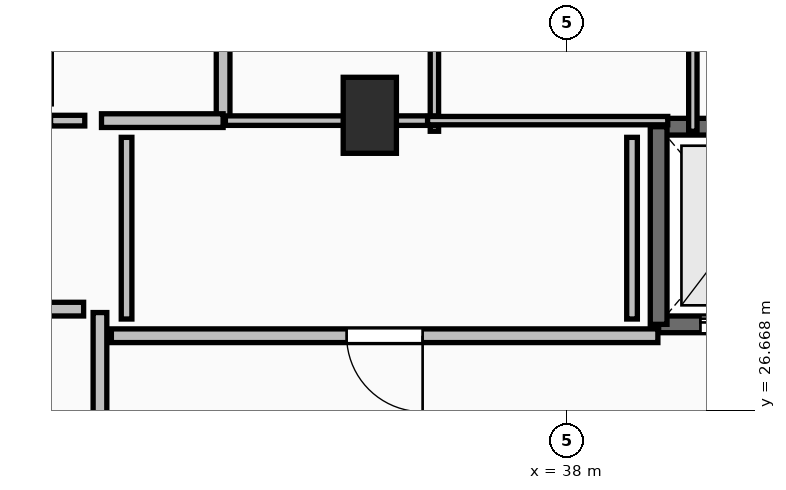
"""IFC4 building model, lengths in metres.
Left out: names, types, materials, properties, quantities, classifications, styles, units other than length and angle.
Written with IfcOpenShell. Run it as: python <this file> out.ifc"""

import sys

from ifc_helpers import new_model, si_unit, direction, frame, frame_2d, origin, origin_2d, place, context, subcontext, project, spatial, rectangle, extrude, element, fill, save


model = new_model("IFC4")
c1 = context("Model", 3, precision=1e-05, world=origin(), true_north=direction((0.0, 1.0)))
c2 = subcontext(c1, "Body", "Model", "MODEL_VIEW")
j1 = project(units=[si_unit("LENGTHUNIT", "METRE"), si_unit("PLANEANGLEUNIT", "RADIAN")], contexts=[c1])
p1 = place(None, origin())
s1 = spatial("IfcSite", under=j1, at=p1, CompositionType="ELEMENT")
p2 = place(p1, origin())
s2 = spatial("IfcBuilding", under=s1, at=p2, CompositionType="ELEMENT")
p3 = place(p2, frame((0.0, 0.0, 255.55)))
s3 = spatial("IfcBuildingStorey", under=s2, at=p3, CompositionType="ELEMENT", Elevation=255.55)
p4 = place(p3, frame((35.4, 30.55, 0.0), z_axis=(0.0, 0.0, 1.0), x_axis=(1.0, 0.0, 0.0)))
e1 = element("IfcColumn", 1, at=p4, inside=s3, PredefinedType="PILASTER", context=c2, shape_type="SweptSolid", body=[
    extrude(rectangle(XDim=0.7, YDim=1.0, at=origin_2d()), origin(), (0.0, 0.0, 1.0), 3.55),
])
p5 = place(p3, frame((39.2, 27.8, 0.0), z_axis=(0.0, 0.0, 1.0), x_axis=(1.0, 0.0, 0.0)))
e2 = element("IfcWall", 2, at=p5, inside=s3, PredefinedType="SOLIDWALL", context=c2, shape_type="SweptSolid", body=[
    extrude(rectangle(XDim=2.2, YDim=0.22, at=frame_2d((1.1, 0.0))), origin(), (0.0, 0.0, 1.0), 3.29),
])
p6 = place(p5, frame((0.55, 0.0, 0.0)))
e3 = element("IfcOpeningElement", 3, at=p6, cuts=e2, PredefinedType="OPENING", context=c2, shape_type="SweptSolid", body=[
    extrude(rectangle(XDim=1.1, YDim=2.2, at=frame_2d((0.55, 1.1))), frame((0.0, 0.125, 0.0), z_axis=(0.0, -1.0, 0.0), x_axis=(1.0, 0.0, 0.0)), (0.0, 0.0, 1.0), 0.25),
])
p7 = place(p3, frame((41.4, 30.4, 0.0), z_axis=(0.0, 0.0, 1.0), x_axis=(-1.0, 0.0, 0.0)))
e4 = element("IfcWall", 4, at=p7, inside=s3, PredefinedType="SOLIDWALL", context=c2, shape_type="SweptSolid", body=[
    extrude(rectangle(XDim=2.2, YDim=0.22, at=frame_2d((1.1, 0.0))), origin(), (0.0, 0.0, 1.0), 3.29),
])
p8 = place(p3, frame((39.2, 30.4, 0.0), z_axis=(0.0, 0.0, 1.0), x_axis=(0.0, -1.0, 0.0)))
e5 = element("IfcWall", 5, at=p8, inside=s3, PredefinedType="SOLIDWALL", context=c2, shape_type="SweptSolid", body=[
    extrude(rectangle(XDim=2.6, YDim=0.22, at=frame_2d((1.3, 0.0))), origin(), (0.0, 0.0, 1.0), 3.29),
])
p9 = place(p3, frame((31.85, 24.045, 0.0), z_axis=(0.0, 0.0, 1.0), x_axis=(0.0, 1.0, 0.0)))
e6 = element("IfcWall", 6, at=p9, inside=s3, PredefinedType="PARTITIONING", context=c2, shape_type="SweptSolid", body=[
    extrude(rectangle(XDim=3.91, YDim=0.18, at=frame_2d((1.955, 0.0))), origin(), (0.0, 0.0, 1.0), 3.29),
])
p10 = place(p9, frame((1.355, 0.0, 0.0)))
e7 = element("IfcOpeningElement", 7, at=p10, cuts=e6, PredefinedType="OPENING", context=c2, shape_type="SweptSolid", body=[
    extrude(rectangle(XDim=1.2, YDim=2.15, at=frame_2d((0.6, 1.075))), frame((0.0, 0.105, 0.0), z_axis=(0.0, -1.0, 0.0), x_axis=(1.0, 0.0, 0.0)), (0.0, 0.0, 1.0), 0.21),
])
p11 = place(p3, frame((33.47, 30.48, 0.0), z_axis=(0.0, 0.0, 1.0), x_axis=(0.0, 1.0, 0.0)))
e8 = element("IfcWall", 8, at=p11, inside=s3, PredefinedType="PARTITIONING", context=c2, shape_type="SweptSolid", body=[
    extrude(rectangle(XDim=3.28, YDim=0.18, at=frame_2d((1.64, 0.0))), origin(), (0.0, 0.0, 1.0), 3.29),
])
p12 = place(p11, frame((1.215, 0.0, 0.0)))
e9 = element("IfcOpeningElement", 9, at=p12, cuts=e8, PredefinedType="OPENING", context=c2, shape_type="SweptSolid", body=[
    extrude(rectangle(XDim=0.85, YDim=2.1, at=frame_2d((0.425, 1.05))), frame((0.0, 0.105, 0.0), z_axis=(0.0, -1.0, 0.0), x_axis=(1.0, 0.0, 0.0)), (0.0, 0.0, 1.0), 0.21),
])
p13 = place(p3, frame((31.87, 30.48, 0.0), z_axis=(0.0, 0.0, 1.0), x_axis=(1.0, 0.0, 0.0)))
e10 = element("IfcWall", 10, at=p13, inside=s3, PredefinedType="PARTITIONING", context=c2, shape_type="SweptSolid", body=[
    extrude(rectangle(XDim=1.6, YDim=0.18, at=frame_2d((0.8, 0.0))), origin(), (0.0, 0.0, 1.0), 3.29),
])
p14 = place(p3, frame((39.19, 27.65, 0.0), z_axis=(0.0, 0.0, 1.0), x_axis=(-1.0, 0.0, 0.0)))
e11 = element("IfcWall", 11, at=p14, inside=s3, PredefinedType="PARTITIONING", context=c2, shape_type="SweptSolid", body=[
    extrude(rectangle(XDim=7.19, YDim=0.18, at=frame_2d((3.595, 0.0))), origin(), (0.0, 0.0, 1.0), 3.29),
])
p15 = place(p14, frame((3.095, 0.0, 0.0)))
e12 = element("IfcOpeningElement", 12, at=p15, cuts=e11, PredefinedType="OPENING", context=c2, shape_type="SweptSolid", body=[
    extrude(rectangle(XDim=1.0, YDim=2.15, at=frame_2d((0.5, 1.075))), frame((0.0, 0.105, 0.0), z_axis=(0.0, -1.0, 0.0), x_axis=(1.0, 0.0, 0.0)), (0.0, 0.0, 1.0), 0.21),
])
p16 = place(p3, frame((36.25, 30.34, 0.0), z_axis=(0.0, 0.0, 1.0), x_axis=(0.0, 1.0, 0.0)))
e13 = element("IfcWall", 13, at=p16, inside=s3, PredefinedType="PARTITIONING", context=c2, shape_type="SweptSolid", body=[
    extrude(rectangle(XDim=3.56, YDim=0.11, at=frame_2d((1.78, 0.0))), origin(), (0.0, 0.0, 1.0), 2.482),
])
p17 = place(p3, frame((33.5, 30.48, 0.0), z_axis=(0.0, 0.0, 1.0), x_axis=(1.0, 0.0, 0.0)))
e14 = element("IfcWall", 14, at=p17, inside=s3, PredefinedType="PARTITIONING", context=c2, shape_type="SweptSolid", body=[
    extrude(rectangle(XDim=2.75, YDim=0.125, at=frame_2d((1.375, 0.0))), origin(), (0.0, 0.0, 1.0), 2.482),
])
p18 = place(p3, frame((39.65, 30.34, 0.0), z_axis=(0.0, 0.0, 1.0), x_axis=(0.0, 1.0, 0.0)))
e15 = element("IfcWall", 15, at=p18, inside=s3, PredefinedType="PARTITIONING", context=c2, shape_type="SweptSolid", body=[
    extrude(rectangle(XDim=3.56, YDim=0.11, at=frame_2d((1.78, 0.0))), origin(), (0.0, 0.0, 1.0), 2.482),
])
p19 = place(p3, frame((36.16, 30.48, 0.0), z_axis=(0.0, 0.0, 1.0), x_axis=(1.0, 0.0, 0.0)))
e16 = element("IfcWall", 16, at=p19, inside=s3, PredefinedType="PARTITIONING", context=c2, shape_type="SweptSolid", body=[
    extrude(rectangle(XDim=3.16, YDim=0.11, at=frame_2d((1.58, 0.0))), origin(), (0.0, 0.0, 1.0), 2.482),
])
p20 = place(p3, frame((31.635, 28.0, 0.0), z_axis=(0.0, 0.0, 1.0), x_axis=(-1.0, 0.0, 0.0)))
e17 = element("IfcWall", 17, at=p20, inside=s3, PredefinedType="PARTITIONING", context=c2, shape_type="SweptSolid", body=[
    extrude(rectangle(XDim=0.915, YDim=0.18, at=frame_2d((0.458, 0.0))), origin(), (0.0, 0.0, 1.0), 3.29),
])
p21 = place(p3, frame((31.2, 30.48, 0.0), z_axis=(0.0, 0.0, 1.0), x_axis=(1.0, 0.0, 0.0)))
e18 = element("IfcWall", 18, at=p21, inside=s3, PredefinedType="PARTITIONING", context=c2, shape_type="SweptSolid", body=[
    extrude(rectangle(XDim=0.45, YDim=0.14, at=frame_2d((0.225, 0.0))), origin(), (0.0, 0.0, 1.0), 3.29),
])
for number, where, z_axis, x_axis in (
    (19, (32.2, 30.26, 0.0), (0.0, 0.0, 1.0), (0.0, -1.0, 0.0)),
    (20, (38.85, 27.87, 0.0), (0.0, 0.0, 1.0), (0.0, 1.0, 0.0)),
):
    element("IfcWall", number, at=place(p3, frame(where, z_axis=z_axis, x_axis=x_axis)), inside=s3, PredefinedType="PARTITIONING", context=c2, shape_type="SweptSolid", body=[
        extrude(rectangle(XDim=2.39, YDim=0.14, at=frame_2d((1.195, 0.0))), origin(), (0.0, 0.0, 1.0), 3.29),
    ])
p22 = place(p6, origin())
e21 = element("IfcDoor", 21, at=p22, inside=s3, OperationType="SLIDING_TO_LEFT", PredefinedType="DOOR", context=c2, shape_type="SweptSolid", body=[
    extrude(rectangle(XDim=1.1, YDim=2.2, at=frame_2d((0.55, 1.1))), frame((0.0, 0.025, 0.0), z_axis=(0.0, -1.0, 0.0), x_axis=(1.0, 0.0, 0.0)), (0.0, 0.0, 1.0), 0.05),
])
fill(e3, e21)
p23 = place(p15, origin())
e22 = element("IfcDoor", 22, at=p23, inside=s3, OperationType="SINGLE_SWING_LEFT", PredefinedType="DOOR", context=c2, shape_type="SweptSolid", body=[
    extrude(rectangle(XDim=1.0, YDim=2.15, at=frame_2d((0.5, 1.075))), frame((0.0, 0.025, 0.0), z_axis=(0.0, -1.0, 0.0), x_axis=(1.0, 0.0, 0.0)), (0.0, 0.0, 1.0), 0.05),
])
fill(e12, e22)
save(model, sys.argv[1])
